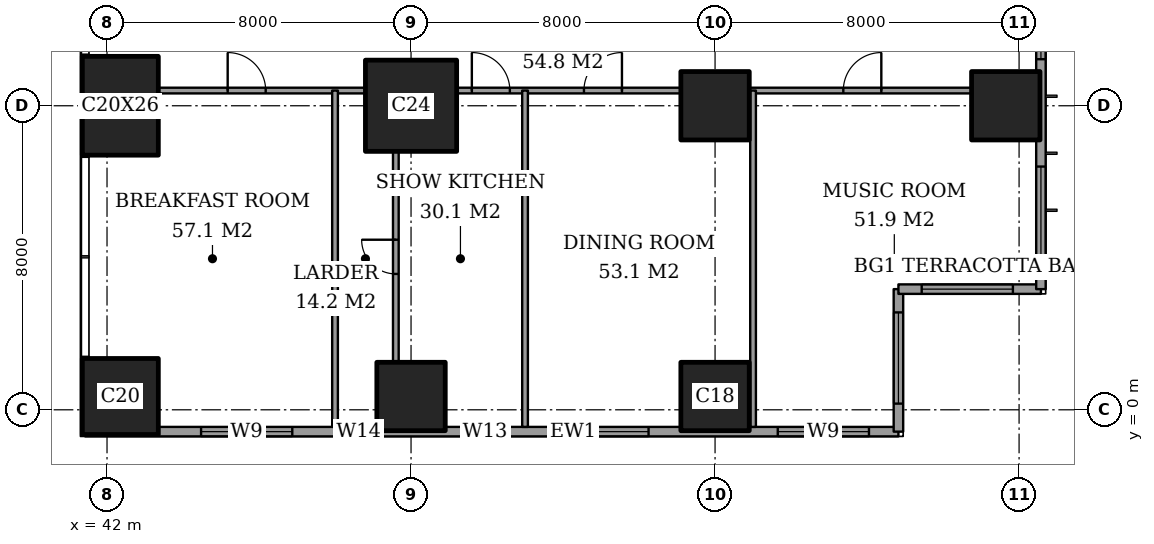
"""IFC4 building model, lengths in metres.
Left out: names, types, materials, properties, quantities, classifications, styles, units other than length and angle.
Written with IfcOpenShell. Run it as: python <this file> out.ifc"""

import sys

from ifc_helpers import new_model, si_unit, direction, frame, frame_2d, origin, origin_2d, place, context, subcontext, project, spatial, rectangle, extrude, element, fill, save


model = new_model("IFC4")
c1 = context("Model", 3, precision=1e-05, world=origin(), true_north=direction((0.0, 1.0)))
c2 = subcontext(c1, "Body", "Model", "MODEL_VIEW")
j1 = project(units=[si_unit("LENGTHUNIT", "METRE"), si_unit("PLANEANGLEUNIT", "RADIAN")], contexts=[c1])
p1 = place(None, origin())
s1 = spatial("IfcSite", under=j1, at=p1, CompositionType="ELEMENT")
p2 = place(p1, origin())
s2 = spatial("IfcBuilding", under=s1, at=p2, CompositionType="ELEMENT")
p3 = place(p2, frame((0.0, 0.0, 196.6)))
s3 = spatial("IfcBuildingStorey", under=s2, at=p3, CompositionType="ELEMENT", Elevation=196.6)
p4 = place(p3, frame((42.35, 0.35, 0.0), z_axis=(0.0, 0.0, 1.0), x_axis=(1.0, 0.0, 0.0)))
e1 = element("IfcColumn", 1, at=p4, inside=s3, PredefinedType="COLUMN", context=c2, shape_type="SweptSolid", body=[
    extrude(rectangle(XDim=2.0, YDim=2.0, at=origin_2d()), origin(), (0.0, 0.0, 1.0), 3.6),
])
p5 = place(p3, frame((42.35, 8.0, 0.0), z_axis=(0.0, 0.0, 1.0), x_axis=(1.0, 0.0, 0.0)))
e2 = element("IfcColumn", 2, at=p5, inside=s3, PredefinedType="COLUMN", context=c2, shape_type="SweptSolid", body=[
    extrude(rectangle(XDim=2.0, YDim=2.6, at=origin_2d()), origin(), (0.0, 0.0, 1.0), 3.6),
])
p6 = place(p3, frame((50.0, 0.35, 0.0), z_axis=(0.0, 0.0, 1.0), x_axis=(1.0, 0.0, 0.0)))
e3 = element("IfcColumn", 3, at=p6, inside=s3, PredefinedType="COLUMN", context=c2, shape_type="SweptSolid", body=[
    extrude(rectangle(XDim=1.8, YDim=1.8, at=origin_2d()), origin(), (0.0, 0.0, 1.0), 3.6),
])
p7 = place(p3, frame((50.0, 8.0, 0.0), z_axis=(0.0, 0.0, 1.0), x_axis=(1.0, 0.0, 0.0)))
e4 = element("IfcColumn", 4, at=p7, inside=s3, PredefinedType="COLUMN", context=c2, shape_type="SweptSolid", body=[
    extrude(rectangle(XDim=2.4, YDim=2.4, at=origin_2d()), origin(), (0.0, 0.0, 1.0), 3.6),
])
for number, where, z_axis, x_axis in (
    (5, (58.0, 0.35, 0.0), (0.0, 0.0, 1.0), (1.0, 0.0, 0.0)),
    (6, (58.0, 8.0, 0.0), (0.0, 0.0, 1.0), (1.0, 0.0, 0.0)),
    (7, (65.65, 8.0, 0.0), (0.0, 0.0, 1.0), (1.0, 0.0, 0.0)),
):
    element("IfcColumn", number, at=place(p3, frame(where, z_axis=z_axis, x_axis=x_axis)), inside=s3, PredefinedType="COLUMN", context=c2, shape_type="SweptSolid", body=[
        extrude(rectangle(XDim=1.8, YDim=1.8, at=origin_2d()), origin(), (0.0, 0.0, 1.0), 3.6),
    ])
p8 = place(p3, frame((41.425, -0.575, 0.0), z_axis=(0.0, 0.0, 1.0), x_axis=(1.0, 0.0, 0.0)))
e8 = element("IfcWall", 8, at=p8, inside=s3, PredefinedType="SOLIDWALL", context=c2, shape_type="SweptSolid", body=[
    extrude(rectangle(XDim=21.4, YDim=0.25, at=frame_2d((10.7, 0.0))), origin(), (0.0, 0.0, 1.0), 3.6),
])
p9 = place(p8, frame((3.05, 0.0, 0.2)))
e9 = element("IfcOpeningElement", 9, at=p9, cuts=e8, PredefinedType="OPENING", context=c2, shape_type="SweptSolid", body=[
    extrude(rectangle(XDim=2.4, YDim=2.4, at=frame_2d((1.2, 1.2))), frame((0.0, 0.135, 0.0), z_axis=(0.0, -1.0, 0.0), x_axis=(1.0, 0.0, 0.0)), (0.0, 0.0, 1.0), 0.27),
])
p10 = place(p8, frame((6.9, 0.0, 0.2)))
e10 = element("IfcOpeningElement", 10, at=p10, cuts=e8, PredefinedType="OPENING", context=c2, shape_type="SweptSolid", body=[
    extrude(rectangle(XDim=0.6, YDim=2.4, at=frame_2d((0.3, 1.2))), frame((0.0, 0.135, 0.0), z_axis=(0.0, -1.0, 0.0), x_axis=(1.0, 0.0, 0.0)), (0.0, 0.0, 1.0), 0.27),
])
p11 = place(p8, frame((9.925, 0.0, 0.2)))
e11 = element("IfcOpeningElement", 11, at=p11, cuts=e8, PredefinedType="OPENING", context=c2, shape_type="SweptSolid", body=[
    extrude(rectangle(XDim=1.2, YDim=2.4, at=frame_2d((0.6, 1.2))), frame((0.0, 0.135, 0.0), z_axis=(0.0, -1.0, 0.0), x_axis=(1.0, 0.0, 0.0)), (0.0, 0.0, 1.0), 0.27),
])
p12 = place(p8, frame((12.425, 0.0, 0.2)))
e12 = element("IfcOpeningElement", 12, at=p12, cuts=e8, PredefinedType="OPENING", context=c2, shape_type="SweptSolid", body=[
    extrude(rectangle(XDim=2.4, YDim=2.4, at=frame_2d((1.2, 1.2))), frame((0.0, 0.135, 0.0), z_axis=(0.0, -1.0, 0.0), x_axis=(1.0, 0.0, 0.0)), (0.0, 0.0, 1.0), 0.27),
])
p13 = place(p8, frame((18.225, 0.0, 0.2)))
e13 = element("IfcOpeningElement", 13, at=p13, cuts=e8, PredefinedType="OPENING", context=c2, shape_type="SweptSolid", body=[
    extrude(rectangle(XDim=2.4, YDim=2.4, at=frame_2d((1.2, 1.2))), frame((0.0, 0.135, 0.0), z_axis=(0.0, -1.0, 0.0), x_axis=(1.0, 0.0, 0.0)), (0.0, 0.0, 1.0), 0.27),
])
p14 = place(p3, frame((62.825, -0.575, 0.0), z_axis=(0.0, 0.0, 1.0), x_axis=(0.0, 1.0, 0.0)))
e14 = element("IfcWall", 14, at=p14, inside=s3, PredefinedType="SOLIDWALL", context=c2, shape_type="SweptSolid", body=[
    extrude(rectangle(XDim=3.75, YDim=0.25, at=frame_2d((1.875, 0.0))), origin(), (0.0, 0.0, 1.0), 3.6),
])
p15 = place(p14, frame((0.738, 0.0, 0.2)))
e15 = element("IfcOpeningElement", 15, at=p15, cuts=e14, PredefinedType="OPENING", context=c2, shape_type="SweptSolid", body=[
    extrude(rectangle(XDim=2.4, YDim=2.4, at=frame_2d((1.2, 1.2))), frame((0.0, 0.135, 0.0), z_axis=(0.0, -1.0, 0.0), x_axis=(1.0, 0.0, 0.0)), (0.0, 0.0, 1.0), 0.27),
])
p16 = place(p3, frame((62.825, 3.175, 0.0), z_axis=(0.0, 0.0, 1.0), x_axis=(1.0, 0.0, 0.0)))
e16 = element("IfcWall", 16, at=p16, inside=s3, PredefinedType="SOLIDWALL", context=c2, shape_type="SweptSolid", body=[
    extrude(rectangle(XDim=3.75, YDim=0.25, at=frame_2d((1.875, 0.0))), origin(), (0.0, 0.0, 1.0), 3.6),
])
p17 = place(p16, frame((0.613, 0.0, 0.2)))
e17 = element("IfcOpeningElement", 17, at=p17, cuts=e16, PredefinedType="OPENING", context=c2, shape_type="SweptSolid", body=[
    extrude(rectangle(XDim=2.4, YDim=2.4, at=frame_2d((1.2, 1.2))), frame((0.0, 0.135, 0.0), z_axis=(0.0, -1.0, 0.0), x_axis=(1.0, 0.0, 0.0)), (0.0, 0.0, 1.0), 0.27),
])
p18 = place(p3, frame((66.575, 3.175, 0.0), z_axis=(0.0, 0.0, 1.0), x_axis=(0.0, 1.0, 0.0)))
e18 = element("IfcWall", 18, at=p18, inside=s3, PredefinedType="SOLIDWALL", context=c2, shape_type="SweptSolid", body=[
    extrude(rectangle(XDim=41.65, YDim=0.25, at=frame_2d((20.825, 0.0))), origin(), (0.0, 0.0, 1.0), 3.6),
])
p19 = place(p18, frame((0.825, 0.0, 0.2)))
e19 = element("IfcOpeningElement", 19, at=p19, cuts=e18, PredefinedType="OPENING", context=c2, shape_type="SweptSolid", body=[
    extrude(rectangle(XDim=2.4, YDim=2.4, at=frame_2d((1.2, 1.2))), frame((0.0, 0.135, 0.0), z_axis=(0.0, -1.0, 0.0), x_axis=(1.0, 0.0, 0.0)), (0.0, 0.0, 1.0), 0.27),
])
p20 = place(p18, frame((6.05, 0.0, 0.2)))
e20 = element("IfcOpeningElement", 20, at=p20, cuts=e18, PredefinedType="OPENING", context=c2, shape_type="SweptSolid", body=[
    extrude(rectangle(XDim=1.2, YDim=2.4, at=frame_2d((0.6, 1.2))), frame((0.0, 0.135, 0.0), z_axis=(0.0, -1.0, 0.0), x_axis=(1.0, 0.0, 0.0)), (0.0, 0.0, 1.0), 0.27),
])
p21 = place(p18, frame((8.475, 0.0, 0.2)))
e21 = element("IfcOpeningElement", 21, at=p21, cuts=e18, PredefinedType="OPENING", context=c2, shape_type="SweptSolid", body=[
    extrude(rectangle(XDim=2.4, YDim=2.4, at=frame_2d((1.2, 1.2))), frame((0.0, 0.135, 0.0), z_axis=(0.0, -1.0, 0.0), x_axis=(1.0, 0.0, 0.0)), (0.0, 0.0, 1.0), 0.27),
])
p22 = place(p18, frame((15.675, 0.0, 0.2)))
e22 = element("IfcOpeningElement", 22, at=p22, cuts=e18, PredefinedType="OPENING", context=c2, shape_type="SweptSolid", body=[
    extrude(rectangle(XDim=2.4, YDim=2.4, at=frame_2d((1.2, 1.2))), frame((0.0, 0.135, 0.0), z_axis=(0.0, -1.0, 0.0), x_axis=(1.0, 0.0, 0.0)), (0.0, 0.0, 1.0), 0.27),
])
p23 = place(p18, frame((23.625, 0.0, 0.2)))
e23 = element("IfcOpeningElement", 23, at=p23, cuts=e18, PredefinedType="OPENING", context=c2, shape_type="SweptSolid", body=[
    extrude(rectangle(XDim=2.4, YDim=2.4, at=frame_2d((1.2, 1.2))), frame((0.0, 0.135, 0.0), z_axis=(0.0, -1.0, 0.0), x_axis=(1.0, 0.0, 0.0)), (0.0, 0.0, 1.0), 0.27),
])
p24 = place(p18, frame((30.775, 0.0, 0.2)))
e24 = element("IfcOpeningElement", 24, at=p24, cuts=e18, PredefinedType="OPENING", context=c2, shape_type="SweptSolid", body=[
    extrude(rectangle(XDim=2.4, YDim=2.4, at=frame_2d((1.2, 1.2))), frame((0.0, 0.135, 0.0), z_axis=(0.0, -1.0, 0.0), x_axis=(1.0, 0.0, 0.0)), (0.0, 0.0, 1.0), 0.27),
])
p25 = place(p18, frame((34.55, 0.0, 0.2)))
e25 = element("IfcOpeningElement", 25, at=p25, cuts=e18, PredefinedType="OPENING", context=c2, shape_type="SweptSolid", body=[
    extrude(rectangle(XDim=1.2, YDim=2.4, at=frame_2d((0.6, 1.2))), frame((0.0, 0.135, 0.0), z_axis=(0.0, -1.0, 0.0), x_axis=(1.0, 0.0, 0.0)), (0.0, 0.0, 1.0), 0.27),
])
p26 = place(p18, frame((38.425, 0.0, 0.2)))
e26 = element("IfcOpeningElement", 26, at=p26, cuts=e18, PredefinedType="OPENING", context=c2, shape_type="SweptSolid", body=[
    extrude(rectangle(XDim=2.4, YDim=2.4, at=frame_2d((1.2, 1.2))), frame((0.0, 0.135, 0.0), z_axis=(0.0, -1.0, 0.0), x_axis=(1.0, 0.0, 0.0)), (0.0, 0.0, 1.0), 0.27),
])
p27 = place(p3, frame((43.35, 8.4, 0.0), z_axis=(0.0, 0.0, 1.0), x_axis=(1.0, 0.0, 0.0)))
e27 = element("IfcWall", 27, at=p27, inside=s3, PredefinedType="PARTITIONING", context=c2, shape_type="SweptSolid", body=[
    extrude(rectangle(XDim=5.45, YDim=0.15, at=frame_2d((2.725, 0.0))), origin(), (0.0, 0.0, 1.0), 3.35),
])
p28 = place(p27, frame((1.825, 0.0, 0.0)))
e28 = element("IfcOpeningElement", 28, at=p28, cuts=e27, PredefinedType="OPENING", context=c2, shape_type="SweptSolid", body=[
    extrude(rectangle(XDim=1.0, YDim=2.1, at=frame_2d((0.5, 1.05))), frame((0.0, 0.085, 0.0), z_axis=(0.0, -1.0, 0.0), x_axis=(1.0, 0.0, 0.0)), (0.0, 0.0, 1.0), 0.17),
])
p29 = place(p3, frame((51.2, 8.4, 0.0), z_axis=(0.0, 0.0, 1.0), x_axis=(1.0, 0.0, 0.0)))
e29 = element("IfcWall", 29, at=p29, inside=s3, PredefinedType="PARTITIONING", context=c2, shape_type="SweptSolid", body=[
    extrude(rectangle(XDim=5.9, YDim=0.15, at=frame_2d((2.95, 0.0))), origin(), (0.0, 0.0, 1.0), 3.35),
])
p30 = place(p29, frame((3.35, 0.0, 0.0)))
e30 = element("IfcOpeningElement", 30, at=p30, cuts=e29, PredefinedType="OPENING", context=c2, shape_type="SweptSolid", body=[
    extrude(rectangle(XDim=1.0, YDim=2.1, at=frame_2d((0.5, 1.05))), frame((0.0, 0.085, 0.0), z_axis=(0.0, -1.0, 0.0), x_axis=(1.0, 0.0, 0.0)), (0.0, 0.0, 1.0), 0.17),
])
p31 = place(p29, frame((0.4, 0.0, 0.0)))
e31 = element("IfcOpeningElement", 31, at=p31, cuts=e29, PredefinedType="OPENING", context=c2, shape_type="SweptSolid", body=[
    extrude(rectangle(XDim=1.0, YDim=2.1, at=frame_2d((0.5, 1.05))), frame((0.0, 0.085, 0.0), z_axis=(0.0, -1.0, 0.0), x_axis=(1.0, 0.0, 0.0)), (0.0, 0.0, 1.0), 0.17),
])
p32 = place(p3, frame((58.9, 8.4, 0.0), z_axis=(0.0, 0.0, 1.0), x_axis=(1.0, 0.0, 0.0)))
e32 = element("IfcWall", 32, at=p32, inside=s3, PredefinedType="PARTITIONING", context=c2, shape_type="SweptSolid", body=[
    extrude(rectangle(XDim=5.85, YDim=0.15, at=frame_2d((2.925, 0.0))), origin(), (0.0, 0.0, 1.0), 3.35),
])
p33 = place(p32, frame((2.475, 0.0, 0.0)))
e33 = element("IfcOpeningElement", 33, at=p33, cuts=e32, PredefinedType="OPENING", context=c2, shape_type="SweptSolid", body=[
    extrude(rectangle(XDim=1.0, YDim=2.1, at=frame_2d((0.5, 1.05))), frame((0.0, 0.085, 0.0), z_axis=(0.0, -1.0, 0.0), x_axis=(1.0, 0.0, 0.0)), (0.0, 0.0, 1.0), 0.17),
])
p34 = place(p3, frame((48.0, -0.45, 0.0), z_axis=(0.0, 0.0, 1.0), x_axis=(0.0, 1.0, 0.0)))
e34 = element("IfcWall", 34, at=p34, inside=s3, PredefinedType="PARTITIONING", context=c2, shape_type="SweptSolid", body=[
    extrude(rectangle(XDim=8.85, YDim=0.15, at=frame_2d((4.425, 0.0))), origin(), (0.0, 0.0, 1.0), 3.35),
])
p35 = place(p3, frame((49.6, 1.25, 0.0), z_axis=(0.0, 0.0, 1.0), x_axis=(0.0, 1.0, 0.0)))
e35 = element("IfcWall", 35, at=p35, inside=s3, PredefinedType="PARTITIONING", context=c2, shape_type="SweptSolid", body=[
    extrude(rectangle(XDim=5.55, YDim=0.15, at=frame_2d((2.775, 0.0))), origin(), (0.0, 0.0, 1.0), 3.35),
])
p36 = place(p35, frame((2.325, 0.0, 0.0)))
e36 = element("IfcOpeningElement", 36, at=p36, cuts=e35, PredefinedType="OPENING", context=c2, shape_type="SweptSolid", body=[
    extrude(rectangle(XDim=0.9, YDim=2.1, at=frame_2d((0.45, 1.05))), frame((0.0, 0.085, 0.0), z_axis=(0.0, -1.0, 0.0), x_axis=(1.0, 0.0, 0.0)), (0.0, 0.0, 1.0), 0.17),
])
for number, where, z_axis, x_axis in (
    (37, (53.0, -0.45, 0.0), (0.0, 0.0, 1.0), (0.0, 1.0, 0.0)),
    (38, (59.0, -0.45, 0.0), (0.0, 0.0, 1.0), (0.0, 1.0, 0.0)),
):
    element("IfcWall", number, at=place(p3, frame(where, z_axis=z_axis, x_axis=x_axis)), inside=s3, PredefinedType="PARTITIONING", context=c2, shape_type="SweptSolid", body=[
        extrude(rectangle(XDim=8.85, YDim=0.15, at=frame_2d((4.425, 0.0))), origin(), (0.0, 0.0, 1.0), 3.35),
    ])
p37 = place(p9, origin())
e39 = element("IfcWindow", 39, at=p37, inside=s3, PartitioningType="SINGLE_PANEL", PredefinedType="WINDOW", context=c2, shape_type="SweptSolid", body=[
    extrude(rectangle(XDim=2.4, YDim=2.4, at=frame_2d((1.2, 1.2))), frame((0.0, 0.03, 0.0), z_axis=(0.0, -1.0, 0.0), x_axis=(1.0, 0.0, 0.0)), (0.0, 0.0, 1.0), 0.06),
])
fill(e9, e39)
p38 = place(p10, origin())
e40 = element("IfcWindow", 40, at=p38, inside=s3, PartitioningType="SINGLE_PANEL", PredefinedType="WINDOW", context=c2, shape_type="SweptSolid", body=[
    extrude(rectangle(XDim=0.6, YDim=2.4, at=frame_2d((0.3, 1.2))), frame((0.0, 0.03, 0.0), z_axis=(0.0, -1.0, 0.0), x_axis=(1.0, 0.0, 0.0)), (0.0, 0.0, 1.0), 0.06),
])
fill(e10, e40)
p39 = place(p11, origin())
e41 = element("IfcWindow", 41, at=p39, inside=s3, PartitioningType="SINGLE_PANEL", PredefinedType="WINDOW", context=c2, shape_type="SweptSolid", body=[
    extrude(rectangle(XDim=1.2, YDim=2.4, at=frame_2d((0.6, 1.2))), frame((0.0, 0.03, 0.0), z_axis=(0.0, -1.0, 0.0), x_axis=(1.0, 0.0, 0.0)), (0.0, 0.0, 1.0), 0.06),
])
fill(e11, e41)
p40 = place(p12, origin())
e42 = element("IfcWindow", 42, at=p40, inside=s3, PartitioningType="SINGLE_PANEL", PredefinedType="WINDOW", context=c2, shape_type="SweptSolid", body=[
    extrude(rectangle(XDim=2.4, YDim=2.4, at=frame_2d((1.2, 1.2))), frame((0.0, 0.03, 0.0), z_axis=(0.0, -1.0, 0.0), x_axis=(1.0, 0.0, 0.0)), (0.0, 0.0, 1.0), 0.06),
])
fill(e12, e42)
p41 = place(p13, origin())
e43 = element("IfcWindow", 43, at=p41, inside=s3, PartitioningType="SINGLE_PANEL", PredefinedType="WINDOW", context=c2, shape_type="SweptSolid", body=[
    extrude(rectangle(XDim=2.4, YDim=2.4, at=frame_2d((1.2, 1.2))), frame((0.0, 0.03, 0.0), z_axis=(0.0, -1.0, 0.0), x_axis=(1.0, 0.0, 0.0)), (0.0, 0.0, 1.0), 0.06),
])
fill(e13, e43)
p42 = place(p15, origin())
e44 = element("IfcWindow", 44, at=p42, inside=s3, PartitioningType="SINGLE_PANEL", PredefinedType="WINDOW", context=c2, shape_type="SweptSolid", body=[
    extrude(rectangle(XDim=2.4, YDim=2.4, at=frame_2d((1.2, 1.2))), frame((0.0, 0.03, 0.0), z_axis=(0.0, -1.0, 0.0), x_axis=(1.0, 0.0, 0.0)), (0.0, 0.0, 1.0), 0.06),
])
fill(e15, e44)
p43 = place(p17, origin())
e45 = element("IfcWindow", 45, at=p43, inside=s3, PartitioningType="SINGLE_PANEL", PredefinedType="WINDOW", context=c2, shape_type="SweptSolid", body=[
    extrude(rectangle(XDim=2.4, YDim=2.4, at=frame_2d((1.2, 1.2))), frame((0.0, 0.03, 0.0), z_axis=(0.0, -1.0, 0.0), x_axis=(1.0, 0.0, 0.0)), (0.0, 0.0, 1.0), 0.06),
])
fill(e17, e45)
p44 = place(p19, origin())
e46 = element("IfcWindow", 46, at=p44, inside=s3, PartitioningType="SINGLE_PANEL", PredefinedType="WINDOW", context=c2, shape_type="SweptSolid", body=[
    extrude(rectangle(XDim=2.4, YDim=2.4, at=frame_2d((1.2, 1.2))), frame((0.0, 0.03, 0.0), z_axis=(0.0, -1.0, 0.0), x_axis=(1.0, 0.0, 0.0)), (0.0, 0.0, 1.0), 0.06),
])
fill(e19, e46)
p45 = place(p20, origin())
e47 = element("IfcWindow", 47, at=p45, inside=s3, PartitioningType="SINGLE_PANEL", PredefinedType="WINDOW", context=c2, shape_type="SweptSolid", body=[
    extrude(rectangle(XDim=1.2, YDim=2.4, at=frame_2d((0.6, 1.2))), frame((0.0, 0.03, 0.0), z_axis=(0.0, -1.0, 0.0), x_axis=(1.0, 0.0, 0.0)), (0.0, 0.0, 1.0), 0.06),
])
fill(e20, e47)
p46 = place(p33, origin())
e48 = element("IfcDoor", 48, at=p46, inside=s3, OperationType="SINGLE_SWING_LEFT", PredefinedType="DOOR", context=c2, shape_type="SweptSolid", body=[
    extrude(rectangle(XDim=1.0, YDim=2.1, at=frame_2d((0.5, 1.05))), frame((0.0, 0.025, 0.0), z_axis=(0.0, -1.0, 0.0), x_axis=(1.0, 0.0, 0.0)), (0.0, 0.0, 1.0), 0.05),
])
fill(e33, e48)
p47 = place(p30, origin())
e49 = element("IfcDoor", 49, at=p47, inside=s3, OperationType="SINGLE_SWING_LEFT", PredefinedType="DOOR", context=c2, shape_type="SweptSolid", body=[
    extrude(rectangle(XDim=1.0, YDim=2.1, at=frame_2d((0.5, 1.05))), frame((0.0, 0.025, 0.0), z_axis=(0.0, -1.0, 0.0), x_axis=(1.0, 0.0, 0.0)), (0.0, 0.0, 1.0), 0.05),
])
fill(e30, e49)
p48 = place(p31, origin())
e50 = element("IfcDoor", 50, at=p48, inside=s3, OperationType="SINGLE_SWING_RIGHT", PredefinedType="DOOR", context=c2, shape_type="SweptSolid", body=[
    extrude(rectangle(XDim=1.0, YDim=2.1, at=frame_2d((0.5, 1.05))), frame((0.0, 0.025, 0.0), z_axis=(0.0, -1.0, 0.0), x_axis=(1.0, 0.0, 0.0)), (0.0, 0.0, 1.0), 0.05),
])
fill(e31, e50)
p49 = place(p36, origin())
e51 = element("IfcDoor", 51, at=p49, inside=s3, OperationType="SINGLE_SWING_LEFT", PredefinedType="DOOR", context=c2, shape_type="SweptSolid", body=[
    extrude(rectangle(XDim=0.9, YDim=2.1, at=frame_2d((0.45, 1.05))), frame((0.0, 0.025, 0.0), z_axis=(0.0, -1.0, 0.0), x_axis=(1.0, 0.0, 0.0)), (0.0, 0.0, 1.0), 0.05),
])
fill(e36, e51)
p50 = place(p28, origin())
e52 = element("IfcDoor", 52, at=p50, inside=s3, OperationType="SINGLE_SWING_RIGHT", PredefinedType="DOOR", context=c2, shape_type="SweptSolid", body=[
    extrude(rectangle(XDim=1.0, YDim=2.1, at=frame_2d((0.5, 1.05))), frame((0.0, 0.025, 0.0), z_axis=(0.0, -1.0, 0.0), x_axis=(1.0, 0.0, 0.0)), (0.0, 0.0, 1.0), 0.05),
])
fill(e28, e52)
save(model, sys.argv[1])
